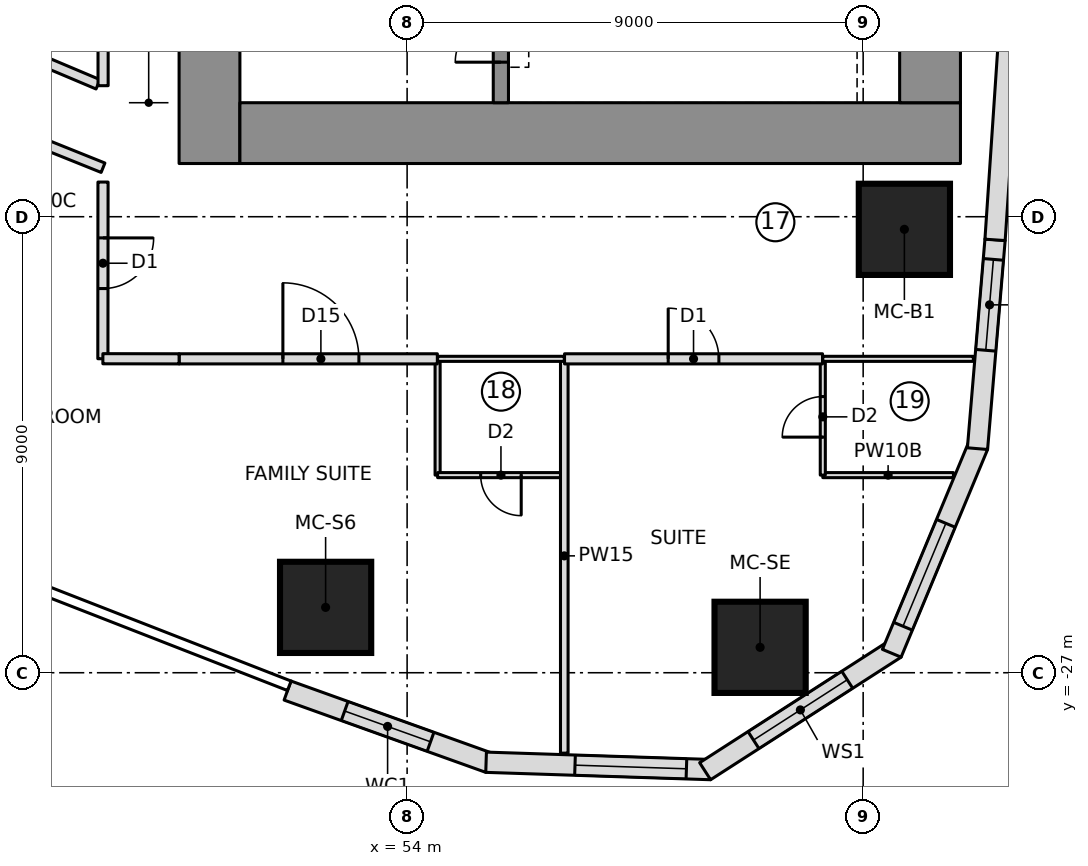
"""IFC4 building model, lengths in metres.
Left out: names, types, materials, properties, quantities, classifications, styles, units other than length and angle.
Written with IfcOpenShell. Run it as: python <this file> out.ifc"""

import sys

from ifc_helpers import new_model, si_unit, direction, frame, frame_2d, origin, origin_2d, place, context, subcontext, project, spatial, polyline, rectangle, outline, extrude, element, fill, save


model = new_model("IFC4")
c1 = context("Model", 3, precision=1e-05, world=origin(), true_north=direction((0.0, 1.0)))
c2 = subcontext(c1, "Body", "Model", "MODEL_VIEW")
j1 = project(units=[si_unit("LENGTHUNIT", "METRE"), si_unit("PLANEANGLEUNIT", "RADIAN")], contexts=[c1])
p1 = place(None, origin())
s1 = spatial("IfcSite", under=j1, at=p1, CompositionType="ELEMENT")
p2 = place(p1, origin())
s2 = spatial("IfcBuilding", under=s1, at=p2, CompositionType="ELEMENT")
p3 = place(p2, frame((0.0, 0.0, 35.0)))
s3 = spatial("IfcBuildingStorey", under=s2, at=p3, CompositionType="ELEMENT", Elevation=35.0)
p4 = place(p3, frame((50.1, -16.95, 0.0), z_axis=(0.0, 0.0, 1.0), x_axis=(0.0, 1.0, 0.0)))
e1 = element("IfcWall", 1, at=p4, inside=s3, PredefinedType="SHEAR", context=c2, shape_type="SweptSolid", body=[
    extrude(rectangle(XDim=10.3, YDim=1.2, at=frame_2d((5.15, 0.0))), origin(), (0.0, 0.0, 1.0), 4.6),
])
p5 = place(p4, frame((2.7, 0.0, 0.0)))
e2 = element("IfcOpeningElement", 2, at=p5, cuts=e1, PredefinedType="OPENING", context=c2, shape_type="SweptSolid", body=[
    extrude(rectangle(XDim=1.1, YDim=2.1, at=frame_2d((0.55, 1.05))), frame((0.0, 0.61, 0.0), z_axis=(0.0, -1.0, 0.0), x_axis=(1.0, 0.0, 0.0)), (0.0, 0.0, 1.0), 1.22),
])
p6 = place(p3, frame((50.7, -16.35, 0.0), z_axis=(0.0, 0.0, 1.0), x_axis=(1.0, 0.0, 0.0)))
e3 = element("IfcWall", 3, at=p6, inside=s3, PredefinedType="SHEAR", context=c2, shape_type="SweptSolid", body=[
    extrude(rectangle(XDim=14.22, YDim=1.2, at=frame_2d((7.11, 0.0))), origin(), (0.0, 0.0, 1.0), 4.6),
])
p7 = place(p3, frame((64.32, -15.75, 0.0), z_axis=(0.0, 0.0, 1.0), x_axis=(0.0, 1.0, 0.0)))
e4 = element("IfcWall", 4, at=p7, inside=s3, PredefinedType="SHEAR", context=c2, shape_type="SweptSolid", body=[
    extrude(rectangle(XDim=5.8, YDim=1.2, at=frame_2d((2.9, 0.0))), origin(), (0.0, 0.0, 1.0), 4.6),
])
p8 = place(p3, frame((55.85, -15.75, 0.0), z_axis=(0.0, 0.0, 1.0), x_axis=(0.0, 1.0, 0.0)))
e5 = element("IfcWall", 5, at=p8, inside=s3, PredefinedType="SHEAR", context=c2, shape_type="SweptSolid", body=[
    extrude(rectangle(XDim=5.4, YDim=0.3, at=frame_2d((2.7, 0.0))), origin(), (0.0, 0.0, 1.0), 4.6),
])
p9 = place(p8, frame((3.6, 0.0, 0.0)))
e6 = element("IfcOpeningElement", 6, at=p9, cuts=e5, PredefinedType="OPENING", context=c2, shape_type="SweptSolid", body=[
    extrude(rectangle(XDim=1.1, YDim=2.1, at=frame_2d((0.55, 1.05))), frame((0.0, 0.16, 0.0), z_axis=(0.0, -1.0, 0.0), x_axis=(1.0, 0.0, 0.0)), (0.0, 0.0, 1.0), 0.32),
])
p10 = place(p8, frame((0.8, 0.0, 0.0)))
e7 = element("IfcOpeningElement", 7, at=p10, cuts=e5, PredefinedType="OPENING", context=c2, shape_type="SweptSolid", body=[
    extrude(rectangle(XDim=0.9, YDim=2.1, at=frame_2d((0.45, 1.05))), frame((0.0, 0.16, 0.0), z_axis=(0.0, -1.0, 0.0), x_axis=(1.0, 0.0, 0.0)), (0.0, 0.0, 1.0), 0.32),
])
for number, where, z_axis, x_axis in (
    (8, (52.392, -25.71, 0.0), (0.0, 0.0, 1.0), (1.0, 0.0, 0.0)),
    (9, (60.966, -26.499, 0.0), (0.0, 0.0, 1.0), (1.0, 0.0, 0.0)),
    (10, (63.813, -18.249, 0.0), (0.0, 0.0, 1.0), (1.0, 0.0, 0.0)),
):
    element("IfcColumn", number, at=place(p3, frame(where, z_axis=z_axis, x_axis=x_axis)), inside=s3, PredefinedType="COLUMN", context=c2, shape_type="SweptSolid", body=[
        extrude(rectangle(XDim=1.8, YDim=1.8, at=origin_2d()), origin(), (0.0, 0.0, 1.0), 4.6),
    ])
p11 = place(p3, frame((51.64, -27.352, 0.0), z_axis=(0.0, 0.0, 1.0), x_axis=(0.941339752885, -0.337460323057, 0.0)))
e11 = element("IfcWall", 11, at=p11, inside=s3, PredefinedType="NOTDEFINED", context=c2, shape_type="SweptSolid", body=[
    extrude(outline(polyline([(0.0, -0.2), (4.228, -0.2), (4.165, 0.2), (0.0, 0.2), (0.0, -0.2)])), origin(), (0.0, 0.0, 1.0), 4.3),
])
p12 = place(p11, frame((1.198, 0.0, 1.8)))
e12 = element("IfcOpeningElement", 12, at=p12, cuts=e11, PredefinedType="OPENING", context=c2, shape_type="SweptSolid", body=[
    extrude(rectangle(XDim=1.8, YDim=1.2, at=frame_2d((0.9, 0.6))), frame((0.0, 0.21, 0.0), z_axis=(0.0, -1.0, 0.0), x_axis=(1.0, 0.0, 0.0)), (0.0, 0.0, 1.0), 0.42),
])
p13 = place(p3, frame((55.59, -28.768, 0.0), z_axis=(0.0, 0.0, 1.0), x_axis=(0.999463576228, -0.032749958686, 0.0)))
e13 = element("IfcWall", 13, at=p13, inside=s3, PredefinedType="NOTDEFINED", context=c2, shape_type="SweptSolid", body=[
    extrude(outline(polyline([(-0.031, -0.2), (4.409, -0.2), (4.284, 0.2), (0.031, 0.2), (-0.031, -0.2)])), origin(), (0.0, 0.0, 1.0), 4.3),
])
p14 = place(p13, frame((1.724, 0.0, 0.6)))
e14 = element("IfcOpeningElement", 14, at=p14, cuts=e13, PredefinedType="OPENING", context=c2, shape_type="SweptSolid", body=[
    extrude(outline(polyline([(0.0, 1.35), (0.084, 1.771), (0.322, 2.128), (0.679, 2.366), (1.1, 2.45), (1.521, 2.366), (1.878, 2.128), (2.116, 1.771), (2.2, 1.35), (2.2, 1.1), (2.116, 0.679), (1.878, 0.322), (1.521, 0.084), (1.1, 0.0), (0.679, 0.084), (0.322, 0.322), (0.084, 0.679), (0.0, 1.1), (0.0, 1.35)])), frame((0.0, 0.21, 0.0), z_axis=(0.0, -1.0, 0.0), x_axis=(1.0, 0.0, 0.0)), (0.0, 0.0, 1.0), 0.42),
])
p15 = place(p3, frame((59.934, -28.91, 0.0), z_axis=(0.0, 0.0, 1.0), x_axis=(0.840937468718, 0.541132307025, 0.0)))
e15 = element("IfcWall", 15, at=p15, inside=s3, PredefinedType="NOTDEFINED", context=c2, shape_type="SweptSolid", body=[
    extrude(outline(polyline([(-0.062, -0.2), (4.409, -0.2), (4.284, 0.2), (0.062, 0.2), (-0.062, -0.2)])), origin(), (0.0, 0.0, 1.0), 4.3),
])
p16 = place(p15, frame((1.073, 0.0, 0.6)))
e16 = element("IfcOpeningElement", 16, at=p16, cuts=e15, PredefinedType="OPENING", context=c2, shape_type="SweptSolid", body=[
    extrude(outline(polyline([(0.0, 1.35), (0.084, 1.771), (0.322, 2.128), (0.679, 2.366), (1.1, 2.45), (1.521, 2.366), (1.878, 2.128), (2.116, 1.771), (2.2, 1.35), (2.2, 1.1), (2.116, 0.679), (1.878, 0.322), (1.521, 0.084), (1.1, 0.0), (0.679, 0.084), (0.322, 0.322), (0.084, 0.679), (0.0, 1.1), (0.0, 1.35)])), frame((0.0, 0.21, 0.0), z_axis=(0.0, -1.0, 0.0), x_axis=(1.0, 0.0, 0.0)), (0.0, 0.0, 1.0), 0.42),
])
p17 = place(p3, frame((63.588, -26.558, 0.0), z_axis=(0.0, 0.0, 1.0), x_axis=(0.384372042685, 0.923178277908, 0.0)))
e17 = element("IfcWall", 17, at=p17, inside=s3, PredefinedType="NOTDEFINED", context=c2, shape_type="SweptSolid", body=[
    extrude(outline(polyline([(-0.062, -0.2), (4.377, -0.2), (4.314, 0.2), (0.062, 0.2), (-0.062, -0.2)])), origin(), (0.0, 0.0, 1.0), 4.3),
])
p18 = place(p17, frame((0.515, 0.0, 0.6)))
e18 = element("IfcOpeningElement", 18, at=p18, cuts=e17, PredefinedType="OPENING", context=c2, shape_type="SweptSolid", body=[
    extrude(outline(polyline([(0.0, 1.35), (0.084, 1.771), (0.322, 2.128), (0.679, 2.366), (1.1, 2.45), (1.521, 2.366), (1.878, 2.128), (2.116, 1.771), (2.2, 1.35), (2.2, 1.1), (2.116, 0.679), (1.878, 0.322), (1.521, 0.084), (1.1, 0.0), (0.679, 0.084), (0.322, 0.322), (0.084, 0.679), (0.0, 1.1), (0.0, 1.35)])), frame((0.0, 0.21, 0.0), z_axis=(0.0, -1.0, 0.0), x_axis=(1.0, 0.0, 0.0)), (0.0, 0.0, 1.0), 0.42),
])
p19 = place(p3, frame((65.259, -22.546, 0.0), z_axis=(0.0, 0.0, 1.0), x_axis=(0.083793550906, 0.996483136248, 0.0)))
e19 = element("IfcWall", 19, at=p19, inside=s3, PredefinedType="NOTDEFINED", context=c2, shape_type="SweptSolid", body=[
    extrude(outline(polyline([(-0.031, -0.2), (4.107, -0.2), (4.104, 0.2), (0.031, 0.2), (-0.031, -0.2)])), origin(), (0.0, 0.0, 1.0), 4.3),
])
p20 = place(p19, frame((1.917, 0.0, 1.8)))
e20 = element("IfcOpeningElement", 20, at=p20, cuts=e19, PredefinedType="OPENING", context=c2, shape_type="SweptSolid", body=[
    extrude(rectangle(XDim=1.8, YDim=1.2, at=frame_2d((0.9, 0.6))), frame((0.0, 0.21, 0.0), z_axis=(0.0, -1.0, 0.0), x_axis=(1.0, 0.0, 0.0)), (0.0, 0.0, 1.0), 0.42),
])
p21 = place(p3, frame((65.603, -18.455, 0.0), z_axis=(0.0, 0.0, 1.0), x_axis=(0.067087430225, 0.997747100575, 0.0)))
e21 = element("IfcWall", 21, at=p21, inside=s3, PredefinedType="NOTDEFINED", context=c2, shape_type="SweptSolid", body=[
    extrude(outline(polyline([(-0.002, -0.2), (4.107, -0.2), (4.103, 0.2), (0.002, 0.2), (-0.002, -0.2)])), origin(), (0.0, 0.0, 1.0), 4.3),
])
p22 = place(p3, frame((54.602, -23.1, 0.0), z_axis=(0.0, 0.0, 1.0), x_axis=(0.0, 1.0, 0.0)))
e22 = element("IfcWall", 22, at=p22, inside=s3, PredefinedType="PARTITIONING", context=c2, shape_type="SweptSolid", body=[
    extrude(rectangle(XDim=2.3, YDim=0.1, at=frame_2d((1.15, 0.0))), origin(), (0.0, 0.0, 1.0), 4.3),
])
p23 = place(p3, frame((57.102, -23.1, 0.0), z_axis=(0.0, 0.0, 1.0), x_axis=(-1.0, 0.0, 0.0)))
e23 = element("IfcWall", 23, at=p23, inside=s3, PredefinedType="PARTITIONING", context=c2, shape_type="SweptSolid", body=[
    extrude(rectangle(XDim=2.5, YDim=0.1, at=frame_2d((1.25, 0.0))), origin(), (0.0, 0.0, 1.0), 4.3),
])
p24 = place(p23, frame((0.85, 0.0, 0.0)))
e24 = element("IfcOpeningElement", 24, at=p24, cuts=e23, PredefinedType="OPENING", context=c2, shape_type="SweptSolid", body=[
    extrude(rectangle(XDim=0.8, YDim=2.1, at=frame_2d((0.4, 1.05))), frame((0.0, 0.06, 0.0), z_axis=(0.0, -1.0, 0.0), x_axis=(1.0, 0.0, 0.0)), (0.0, 0.0, 1.0), 0.12),
])
p25 = place(p3, frame((64.781, -23.1, 0.0), z_axis=(0.0, 0.0, 1.0), x_axis=(-1.0, 0.0, 0.0)))
e25 = element("IfcWall", 25, at=p25, inside=s3, PredefinedType="PARTITIONING", context=c2, shape_type="SweptSolid", body=[
    extrude(rectangle(XDim=2.578, YDim=0.1, at=frame_2d((1.289, 0.0))), origin(), (0.0, 0.0, 1.0), 4.3),
])
p26 = place(p3, frame((62.203, -23.1, 0.0), z_axis=(0.0, 0.0, 1.0), x_axis=(0.0, 1.0, 0.0)))
e26 = element("IfcWall", 26, at=p26, inside=s3, PredefinedType="PARTITIONING", context=c2, shape_type="SweptSolid", body=[
    extrude(rectangle(XDim=2.3, YDim=0.1, at=frame_2d((1.15, 0.0))), origin(), (0.0, 0.0, 1.0), 4.3),
])
p27 = place(p26, frame((0.75, 0.0, 0.0)))
e27 = element("IfcOpeningElement", 27, at=p27, cuts=e26, PredefinedType="OPENING", context=c2, shape_type="SweptSolid", body=[
    extrude(rectangle(XDim=0.8, YDim=2.1, at=frame_2d((0.4, 1.05))), frame((0.0, 0.06, 0.0), z_axis=(0.0, -1.0, 0.0), x_axis=(1.0, 0.0, 0.0)), (0.0, 0.0, 1.0), 0.12),
])
p28 = place(p3, frame((57.102, -28.587, 0.0), z_axis=(0.0, 0.0, 1.0), x_axis=(0.0, 1.0, 0.0)))
e28 = element("IfcWall", 28, at=p28, inside=s3, PredefinedType="PARTITIONING", context=c2, shape_type="SweptSolid", body=[
    extrude(rectangle(XDim=7.787, YDim=0.15, at=frame_2d((3.894, 0.0))), origin(), (0.0, 0.0, 1.0), 4.3),
])
p29 = place(p3, frame((47.9, -15.387, 0.0), z_axis=(0.0, 0.0, 1.0), x_axis=(-0.921257124206, 0.388954124673, 0.0)))
e29 = element("IfcWall", 29, at=p29, inside=s3, PredefinedType="PARTITIONING", context=c2, shape_type="SweptSolid", body=[
    extrude(rectangle(XDim=3.856, YDim=0.2, at=frame_2d((1.928, 0.0))), origin(), (0.0, 0.0, 1.0), 4.3),
])
p30 = place(p29, frame((1.618, 0.0, 0.0)))
e30 = element("IfcOpeningElement", 30, at=p30, cuts=e29, PredefinedType="OPENING", context=c2, shape_type="SweptSolid", body=[
    extrude(rectangle(XDim=1.0, YDim=2.1, at=frame_2d((0.5, 1.05))), frame((0.0, 0.11, 0.0), z_axis=(0.0, -1.0, 0.0), x_axis=(1.0, 0.0, 0.0)), (0.0, 0.0, 1.0), 0.22),
])
p31 = place(p3, frame((49.5, -20.805, 0.0), z_axis=(0.0, 0.0, 1.0), x_axis=(1.0, 0.0, 0.0)))
e31 = element("IfcWall", 31, at=p31, inside=s3, PredefinedType="PARTITIONING", context=c2, shape_type="SweptSolid", body=[
    extrude(rectangle(XDim=5.097, YDim=0.2, at=frame_2d((2.548, 0.0))), origin(), (0.0, 0.0, 1.0), 4.3),
])
p32 = place(p31, frame((2.048, 0.0, 0.0)))
e32 = element("IfcOpeningElement", 32, at=p32, cuts=e31, PredefinedType="OPENING", context=c2, shape_type="SweptSolid", body=[
    extrude(rectangle(XDim=1.5, YDim=2.1, at=frame_2d((0.75, 1.05))), frame((0.0, 0.11, 0.0), z_axis=(0.0, -1.0, 0.0), x_axis=(1.0, 0.0, 0.0)), (0.0, 0.0, 1.0), 0.22),
])
p33 = place(p3, frame((57.107, -20.805, 0.0), z_axis=(0.0, 0.0, 1.0), x_axis=(1.0, 0.0, 0.0)))
e33 = element("IfcWall", 33, at=p33, inside=s3, PredefinedType="PARTITIONING", context=c2, shape_type="SweptSolid", body=[
    extrude(rectangle(XDim=5.092, YDim=0.2, at=frame_2d((2.546, 0.0))), origin(), (0.0, 0.0, 1.0), 4.3),
])
p34 = place(p33, frame((2.046, 0.0, 0.0)))
e34 = element("IfcOpeningElement", 34, at=p34, cuts=e33, PredefinedType="OPENING", context=c2, shape_type="SweptSolid", body=[
    extrude(rectangle(XDim=1.0, YDim=2.1, at=frame_2d((0.5, 1.05))), frame((0.0, 0.11, 0.0), z_axis=(0.0, -1.0, 0.0), x_axis=(1.0, 0.0, 0.0)), (0.0, 0.0, 1.0), 0.22),
])
p35 = place(p3, frame((54.602, -20.805, 0.0), z_axis=(0.0, 0.0, 1.0), x_axis=(1.0, 0.0, 0.0)))
e35 = element("IfcWall", 35, at=p35, inside=s3, PredefinedType="PARTITIONING", context=c2, shape_type="SweptSolid", body=[
    extrude(rectangle(XDim=2.5, YDim=0.1, at=frame_2d((1.25, 0.0))), origin(), (0.0, 0.0, 1.0), 4.3),
])
p36 = place(p3, frame((62.203, -20.805, 0.0), z_axis=(0.0, 0.0, 1.0), x_axis=(1.0, 0.0, 0.0)))
e36 = element("IfcWall", 36, at=p36, inside=s3, PredefinedType="PARTITIONING", context=c2, shape_type="SweptSolid", body=[
    extrude(rectangle(XDim=2.971, YDim=0.1, at=frame_2d((1.486, 0.0))), origin(), (0.0, 0.0, 1.0), 4.3),
])
p37 = place(p3, frame((47.999, -17.316, 0.0), z_axis=(0.0, 0.0, 1.0), x_axis=(-0.000770200024, -0.999999703396, 0.0)))
e37 = element("IfcWall", 37, at=p37, inside=s3, PredefinedType="PARTITIONING", context=c2, shape_type="SweptSolid", body=[
    extrude(rectangle(XDim=3.487, YDim=0.2, at=frame_2d((1.743, 0.0))), origin(), (0.0, 0.0, 1.0), 4.3),
])
p38 = place(p37, frame((1.102, 0.0, 0.0)))
e38 = element("IfcOpeningElement", 38, at=p38, cuts=e37, PredefinedType="OPENING", context=c2, shape_type="SweptSolid", body=[
    extrude(rectangle(XDim=1.0, YDim=2.1, at=frame_2d((0.5, 1.05))), frame((0.0, 0.11, 0.0), z_axis=(0.0, -1.0, 0.0), x_axis=(1.0, 0.0, 0.0)), (0.0, 0.0, 1.0), 0.22),
])
p39 = place(p3, frame((48.0, 15.414, 0.0), z_axis=(0.0, 0.0, 1.0), x_axis=(0.0, -1.0, 0.0)))
e39 = element("IfcWall", 39, at=p39, inside=s3, PredefinedType="PARTITIONING", context=c2, shape_type="SweptSolid", body=[
    extrude(rectangle(XDim=30.828, YDim=0.2, at=frame_2d((15.414, 0.0))), origin(), (0.0, 0.0, 1.0), 4.3),
])
p40 = place(p3, frame((46.852, -16.573, 0.0), z_axis=(0.0, 0.0, 1.0), x_axis=(0.927985362933, -0.372616647752, 0.0)))
e40 = element("IfcWall", 40, at=p40, inside=s3, PredefinedType="PARTITIONING", context=c2, shape_type="SweptSolid", body=[
    extrude(rectangle(XDim=1.236, YDim=0.2, at=frame_2d((0.618, 0.0))), origin(), (0.0, 0.0, 1.0), 4.3),
])
p41 = place(p3, frame((47.996, -20.803, 0.0), z_axis=(0.0, 0.0, 1.0), x_axis=(0.999998933031, -0.001460800259, 0.0)))
e41 = element("IfcWall", 41, at=p41, inside=s3, PredefinedType="PARTITIONING", context=c2, shape_type="SweptSolid", body=[
    extrude(rectangle(XDim=1.504, YDim=0.2, at=frame_2d((0.752, 0.0))), origin(), (0.0, 0.0, 1.0), 4.3),
])
p42 = place(p12, origin())
e42 = element("IfcWindow", 42, at=p42, inside=s3, PartitioningType="SINGLE_PANEL", PredefinedType="WINDOW", context=c2, shape_type="SweptSolid", body=[
    extrude(rectangle(XDim=1.8, YDim=1.2, at=frame_2d((0.9, 0.6))), frame((0.0, 0.17, 0.0), z_axis=(0.0, -1.0, 0.0), x_axis=(1.0, 0.0, 0.0)), (0.0, 0.0, 1.0), 0.06),
])
fill(e12, e42)
p43 = place(p14, origin())
e43 = element("IfcWindow", 43, at=p43, inside=s3, PartitioningType="SINGLE_PANEL", PredefinedType="WINDOW", context=c2, shape_type="SweptSolid", body=[
    extrude(outline(polyline([(0.0, 1.35), (0.084, 1.771), (0.322, 2.128), (0.679, 2.366), (1.1, 2.45), (1.521, 2.366), (1.878, 2.128), (2.116, 1.771), (2.2, 1.35), (2.2, 1.1), (2.116, 0.679), (1.878, 0.322), (1.521, 0.084), (1.1, 0.0), (0.679, 0.084), (0.322, 0.322), (0.084, 0.679), (0.0, 1.1), (0.0, 1.35)])), frame((0.0, 0.17, 0.0), z_axis=(0.0, -1.0, 0.0), x_axis=(1.0, 0.0, 0.0)), (0.0, 0.0, 1.0), 0.06),
])
fill(e14, e43)
p44 = place(p16, origin())
e44 = element("IfcWindow", 44, at=p44, inside=s3, PartitioningType="SINGLE_PANEL", PredefinedType="WINDOW", context=c2, shape_type="SweptSolid", body=[
    extrude(outline(polyline([(0.0, 1.35), (0.084, 1.771), (0.322, 2.128), (0.679, 2.366), (1.1, 2.45), (1.521, 2.366), (1.878, 2.128), (2.116, 1.771), (2.2, 1.35), (2.2, 1.1), (2.116, 0.679), (1.878, 0.322), (1.521, 0.084), (1.1, 0.0), (0.679, 0.084), (0.322, 0.322), (0.084, 0.679), (0.0, 1.1), (0.0, 1.35)])), frame((0.0, 0.17, 0.0), z_axis=(0.0, -1.0, 0.0), x_axis=(1.0, 0.0, 0.0)), (0.0, 0.0, 1.0), 0.06),
])
fill(e16, e44)
p45 = place(p18, origin())
e45 = element("IfcWindow", 45, at=p45, inside=s3, PartitioningType="SINGLE_PANEL", PredefinedType="WINDOW", context=c2, shape_type="SweptSolid", body=[
    extrude(outline(polyline([(0.0, 1.35), (0.084, 1.771), (0.322, 2.128), (0.679, 2.366), (1.1, 2.45), (1.521, 2.366), (1.878, 2.128), (2.116, 1.771), (2.2, 1.35), (2.2, 1.1), (2.116, 0.679), (1.878, 0.322), (1.521, 0.084), (1.1, 0.0), (0.679, 0.084), (0.322, 0.322), (0.084, 0.679), (0.0, 1.1), (0.0, 1.35)])), frame((0.0, 0.17, 0.0), z_axis=(0.0, -1.0, 0.0), x_axis=(1.0, 0.0, 0.0)), (0.0, 0.0, 1.0), 0.06),
])
fill(e18, e45)
p46 = place(p20, origin())
e46 = element("IfcWindow", 46, at=p46, inside=s3, PartitioningType="SINGLE_PANEL", PredefinedType="WINDOW", context=c2, shape_type="SweptSolid", body=[
    extrude(rectangle(XDim=1.8, YDim=1.2, at=frame_2d((0.9, 0.6))), frame((0.0, 0.17, 0.0), z_axis=(0.0, -1.0, 0.0), x_axis=(1.0, 0.0, 0.0)), (0.0, 0.0, 1.0), 0.06),
])
fill(e20, e46)
p47 = place(p24, origin())
e47 = element("IfcDoor", 47, at=p47, inside=s3, OperationType="SINGLE_SWING_LEFT", PredefinedType="DOOR", context=c2, shape_type="SweptSolid", body=[
    extrude(rectangle(XDim=0.8, YDim=2.1, at=frame_2d((0.4, 1.05))), frame((0.0, 0.025, 0.0), z_axis=(0.0, -1.0, 0.0), x_axis=(1.0, 0.0, 0.0)), (0.0, 0.0, 1.0), 0.05),
])
fill(e24, e47)
p48 = place(p27, origin())
e48 = element("IfcDoor", 48, at=p48, inside=s3, OperationType="SINGLE_SWING_LEFT", PredefinedType="DOOR", context=c2, shape_type="SweptSolid", body=[
    extrude(rectangle(XDim=0.8, YDim=2.1, at=frame_2d((0.4, 1.05))), frame((0.0, 0.025, 0.0), z_axis=(0.0, -1.0, 0.0), x_axis=(1.0, 0.0, 0.0)), (0.0, 0.0, 1.0), 0.05),
])
fill(e27, e48)
p49 = place(p32, origin())
e49 = element("IfcDoor", 49, at=p49, inside=s3, OperationType="DOUBLE_DOOR_SINGLE_SWING", PredefinedType="DOOR", context=c2, shape_type="SweptSolid", body=[
    extrude(rectangle(XDim=1.5, YDim=2.1, at=frame_2d((0.75, 1.05))), frame((0.0, 0.025, 0.0), z_axis=(0.0, -1.0, 0.0), x_axis=(1.0, 0.0, 0.0)), (0.0, 0.0, 1.0), 0.05),
])
fill(e32, e49)
p50 = place(p34, origin())
e50 = element("IfcDoor", 50, at=p50, inside=s3, OperationType="SINGLE_SWING_LEFT", PredefinedType="DOOR", context=c2, shape_type="SweptSolid", body=[
    extrude(rectangle(XDim=1.0, YDim=2.1, at=frame_2d((0.5, 1.05))), frame((0.0, 0.025, 0.0), z_axis=(0.0, -1.0, 0.0), x_axis=(1.0, 0.0, 0.0)), (0.0, 0.0, 1.0), 0.05),
])
fill(e34, e50)
p51 = place(p38, origin())
e51 = element("IfcDoor", 51, at=p51, inside=s3, OperationType="SINGLE_SWING_LEFT", PredefinedType="DOOR", context=c2, shape_type="SweptSolid", body=[
    extrude(rectangle(XDim=1.0, YDim=2.1, at=frame_2d((0.5, 1.05))), frame((0.0, 0.025, 0.0), z_axis=(0.0, -1.0, 0.0), x_axis=(1.0, 0.0, 0.0)), (0.0, 0.0, 1.0), 0.05),
])
fill(e38, e51)
p52 = place(p10, origin())
e52 = element("IfcDoor", 52, at=p52, inside=s3, OperationType="SINGLE_SWING_LEFT", PredefinedType="DOOR", context=c2, shape_type="SweptSolid", body=[
    extrude(rectangle(XDim=0.9, YDim=2.1, at=frame_2d((0.45, 1.05))), frame((0.0, 0.025, 0.0), z_axis=(0.0, -1.0, 0.0), x_axis=(1.0, 0.0, 0.0)), (0.0, 0.0, 1.0), 0.05),
])
fill(e7, e52)
save(model, sys.argv[1])
